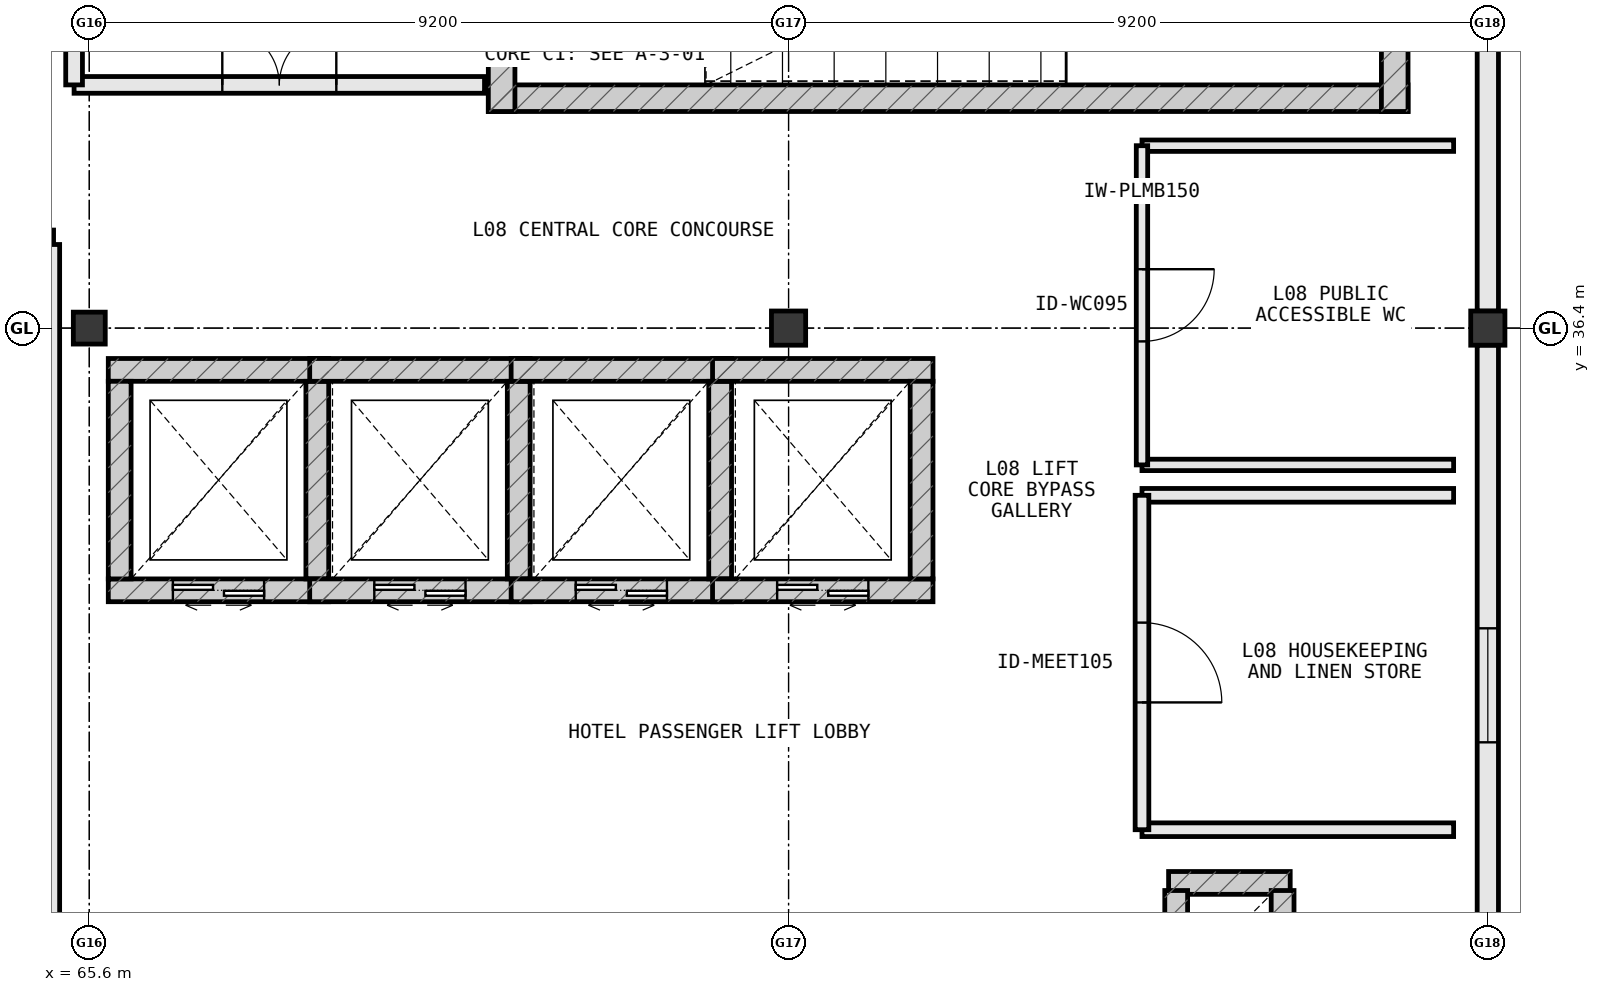
"""IFC4 building model, lengths in metres.
Left out: names, types, materials, properties, quantities, classifications, styles, units other than length and angle.
Written with IfcOpenShell. Run it as: python <this file> out.ifc"""

import sys

from ifc_helpers import new_model, si_unit, direction, frame, frame_2d, origin, origin_2d, place, context, subcontext, project, spatial, rectangle, extrude, element, fill, save


model = new_model("IFC4")
c1 = context("Model", 3, precision=1e-05, world=origin(), true_north=direction((0.0, 1.0)))
c2 = subcontext(c1, "Body", "Model", "MODEL_VIEW")
j1 = project(units=[si_unit("LENGTHUNIT", "METRE"), si_unit("PLANEANGLEUNIT", "RADIAN")], contexts=[c1])
p1 = place(None, origin())
s1 = spatial("IfcSite", under=j1, at=p1, CompositionType="ELEMENT")
p2 = place(p1, origin())
s2 = spatial("IfcBuilding", under=s1, at=p2, CompositionType="ELEMENT")
p3 = place(p2, frame((0.0, 0.0, 35.2)))
s3 = spatial("IfcBuildingStorey", under=s2, at=p3, CompositionType="ELEMENT", Elevation=35.2)
for number, where, z_axis, x_axis in (
    (1, (74.8, 36.4, 0.0), (0.0, 0.0, 1.0), (1.0, 0.0, 0.0)),
    (2, (84.0, 36.4, 0.0), (0.0, 0.0, 1.0), (1.0, 0.0, 0.0)),
):
    element("IfcColumn", number, at=place(p3, frame(where, z_axis=z_axis, x_axis=x_axis)), inside=s3, PredefinedType="COLUMN", context=c2, shape_type="SweptSolid", body=[
        extrude(rectangle(XDim=0.45, YDim=0.45, at=origin_2d()), origin(), (0.0, 0.0, 1.0), 3.8),
    ])
p4 = place(p3, frame((65.6, 36.4, 0.0), z_axis=(0.0, 0.0, 1.0), x_axis=(1.0, 0.0, 0.0)))
e3 = element("IfcColumn", 3, at=p4, inside=s3, PredefinedType="COLUMN", context=c2, shape_type="SweptSolid", body=[
    extrude(rectangle(XDim=0.42, YDim=0.42, at=origin_2d()), origin(), (0.0, 0.0, 1.0), 3.8),
])
p5 = place(p3, frame((81.4, 29.1, 0.0), z_axis=(0.0, 0.0, 1.0), x_axis=(-1.0, 0.0, 0.0)))
e4 = element("IfcWall", 4, at=p5, inside=s3, PredefinedType="SHEAR", context=c2, shape_type="SweptSolid", body=[
    extrude(rectangle(XDim=1.6, YDim=0.3, at=frame_2d((0.8, 0.0))), origin(), (0.0, 0.0, 1.0), 3.565),
])
for number, where, z_axis, x_axis in (
    (5, (79.9, 29.0, 0.0), (0.0, 0.0, 1.0), (0.0, -1.0, 0.0)),
    (6, (81.3, 27.8, 0.0), (0.0, 0.0, 1.0), (0.0, 1.0, 0.0)),
):
    element("IfcWall", number, at=place(p3, frame(where, z_axis=z_axis, x_axis=x_axis)), inside=s3, PredefinedType="SHEAR", context=c2, shape_type="SweptSolid", body=[
        extrude(rectangle(XDim=1.2, YDim=0.3, at=frame_2d((0.6, 0.0))), origin(), (0.0, 0.0, 1.0), 3.565),
    ])
p6 = place(p3, frame((84.0, 27.223, 0.0), z_axis=(0.0, 0.0, 1.0), x_axis=(0.0, 1.0, 0.0)))
e7 = element("IfcWall", 7, at=p6, inside=s3, PredefinedType="STANDARD", context=c2, shape_type="SweptSolid", body=[
    extrude(rectangle(XDim=8.954, YDim=0.28, at=frame_2d((4.477, 0.0))), origin(), (0.0, 0.0, 1.0), 2.98),
])
p7 = place(p6, frame((3.727, 0.0, 0.85)))
e8 = element("IfcOpeningElement", 8, at=p7, cuts=e7, PredefinedType="OPENING", context=c2, shape_type="SweptSolid", body=[
    extrude(rectangle(XDim=1.5, YDim=1.75, at=frame_2d((0.75, 0.875))), frame((0.0, 0.152, 0.0), z_axis=(0.0, -1.0, 0.0), x_axis=(1.0, 0.0, 0.0)), (0.0, 0.0, 1.0), 0.304),
])
p8 = place(p3, frame((84.0, 36.623, 0.0), z_axis=(0.0, 0.0, 1.0), x_axis=(0.0, 1.0, 0.0)))
e9 = element("IfcWall", 9, at=p8, inside=s3, PredefinedType="STANDARD", context=c2, shape_type="SweptSolid", body=[
    extrude(rectangle(XDim=10.354, YDim=0.28, at=frame_2d((5.177, 0.0))), origin(), (0.0, 0.0, 1.0), 2.98),
])
p9 = place(p8, frame((7.015, 0.0, 0.85)))
e10 = element("IfcOpeningElement", 10, at=p9, cuts=e9, PredefinedType="OPENING", context=c2, shape_type="SweptSolid", body=[
    extrude(rectangle(XDim=1.5, YDim=1.75, at=frame_2d((0.75, 0.875))), frame((0.0, 0.152, 0.0), z_axis=(0.0, -1.0, 0.0), x_axis=(1.0, 0.0, 0.0)), (0.0, 0.0, 1.0), 0.304),
])
p10 = place(p3, frame((70.85, 39.425, 0.0), z_axis=(0.0, 0.0, 1.0), x_axis=(1.0, 0.0, 0.0)))
e11 = element("IfcWall", 11, at=p10, inside=s3, PredefinedType="SHEAR", context=c2, shape_type="SweptSolid", body=[
    extrude(rectangle(XDim=12.1, YDim=0.35, at=frame_2d((6.05, 0.0))), origin(), (0.0, 0.0, 1.0), 3.8),
])
p11 = place(p3, frame((82.775, 39.25, 0.0), z_axis=(0.0, 0.0, 1.0), x_axis=(0.0, 1.0, 0.0)))
e12 = element("IfcWall", 12, at=p11, inside=s3, PredefinedType="SHEAR", context=c2, shape_type="SweptSolid", body=[
    extrude(rectangle(XDim=5.1, YDim=0.35, at=frame_2d((2.55, 0.0))), origin(), (0.0, 0.0, 1.0), 3.8),
])
p12 = place(p3, frame((71.025, 44.35, 0.0), z_axis=(0.0, 0.0, 1.0), x_axis=(0.0, -1.0, 0.0)))
e13 = element("IfcWall", 13, at=p12, inside=s3, PredefinedType="SHEAR", context=c2, shape_type="SweptSolid", body=[
    extrude(rectangle(XDim=5.1, YDim=0.35, at=frame_2d((2.55, 0.0))), origin(), (0.0, 0.0, 1.0), 3.8),
])
p13 = place(p12, frame((2.0, 0.0, 0.0)))
e14 = element("IfcOpeningElement", 14, at=p13, cuts=e13, PredefinedType="OPENING", context=c2, shape_type="SweptSolid", body=[
    extrude(rectangle(XDim=1.1, YDim=2.2, at=frame_2d((0.55, 1.1))), frame((0.0, 0.187, 0.0), z_axis=(0.0, -1.0, 0.0), x_axis=(1.0, 0.0, 0.0)), (0.0, 0.0, 1.0), 0.374),
])
p14 = place(p3, frame((65.85, 32.95, 0.0), z_axis=(0.0, 0.0, 1.0), x_axis=(1.0, 0.0, 0.0)))
e15 = element("IfcWall", 15, at=p14, inside=s3, PredefinedType="SHEAR", context=c2, shape_type="SweptSolid", body=[
    extrude(rectangle(XDim=2.9, YDim=0.3, at=frame_2d((1.45, 0.0))), origin(), (0.0, 0.0, 1.0), 3.8),
])
p15 = place(p14, frame((0.85, 0.0, 0.0)))
e16 = element("IfcOpeningElement", 16, at=p15, cuts=e15, PredefinedType="OPENING", context=c2, shape_type="SweptSolid", body=[
    extrude(rectangle(XDim=1.2, YDim=2.2, at=frame_2d((0.6, 1.1))), frame((0.0, 0.162, 0.0), z_axis=(0.0, -1.0, 0.0), x_axis=(1.0, 0.0, 0.0)), (0.0, 0.0, 1.0), 0.324),
])
p16 = place(p3, frame((68.75, 35.85, 0.0), z_axis=(0.0, 0.0, 1.0), x_axis=(-1.0, 0.0, 0.0)))
e17 = element("IfcWall", 17, at=p16, inside=s3, PredefinedType="SHEAR", context=c2, shape_type="SweptSolid", body=[
    extrude(rectangle(XDim=2.9, YDim=0.3, at=frame_2d((1.45, 0.0))), origin(), (0.0, 0.0, 1.0), 3.8),
])
for number, where, z_axis, x_axis in (
    (18, (68.6, 33.1, 0.0), (0.0, 0.0, 1.0), (0.0, 1.0, 0.0)),
    (19, (66.0, 35.7, 0.0), (0.0, 0.0, 1.0), (0.0, -1.0, 0.0)),
):
    element("IfcWall", number, at=place(p3, frame(where, z_axis=z_axis, x_axis=x_axis)), inside=s3, PredefinedType="SHEAR", context=c2, shape_type="SweptSolid", body=[
        extrude(rectangle(XDim=2.6, YDim=0.3, at=frame_2d((1.3, 0.0))), origin(), (0.0, 0.0, 1.0), 3.8),
    ])
p17 = place(p3, frame((68.5, 32.95, 0.0), z_axis=(0.0, 0.0, 1.0), x_axis=(1.0, 0.0, 0.0)))
e20 = element("IfcWall", 20, at=p17, inside=s3, PredefinedType="SHEAR", context=c2, shape_type="SweptSolid", body=[
    extrude(rectangle(XDim=2.9, YDim=0.3, at=frame_2d((1.45, 0.0))), origin(), (0.0, 0.0, 1.0), 3.8),
])
p18 = place(p17, frame((0.85, 0.0, 0.0)))
e21 = element("IfcOpeningElement", 21, at=p18, cuts=e20, PredefinedType="OPENING", context=c2, shape_type="SweptSolid", body=[
    extrude(rectangle(XDim=1.2, YDim=2.2, at=frame_2d((0.6, 1.1))), frame((0.0, 0.162, 0.0), z_axis=(0.0, -1.0, 0.0), x_axis=(1.0, 0.0, 0.0)), (0.0, 0.0, 1.0), 0.324),
])
p19 = place(p3, frame((71.4, 35.85, 0.0), z_axis=(0.0, 0.0, 1.0), x_axis=(-1.0, 0.0, 0.0)))
e22 = element("IfcWall", 22, at=p19, inside=s3, PredefinedType="SHEAR", context=c2, shape_type="SweptSolid", body=[
    extrude(rectangle(XDim=2.9, YDim=0.3, at=frame_2d((1.45, 0.0))), origin(), (0.0, 0.0, 1.0), 3.8),
])
p20 = place(p3, frame((71.25, 33.1, 0.0), z_axis=(0.0, 0.0, 1.0), x_axis=(0.0, 1.0, 0.0)))
e23 = element("IfcWall", 23, at=p20, inside=s3, PredefinedType="SHEAR", context=c2, shape_type="SweptSolid", body=[
    extrude(rectangle(XDim=2.6, YDim=0.3, at=frame_2d((1.3, 0.0))), origin(), (0.0, 0.0, 1.0), 3.8),
])
p21 = place(p3, frame((71.15, 32.95, 0.0), z_axis=(0.0, 0.0, 1.0), x_axis=(1.0, 0.0, 0.0)))
e24 = element("IfcWall", 24, at=p21, inside=s3, PredefinedType="SHEAR", context=c2, shape_type="SweptSolid", body=[
    extrude(rectangle(XDim=2.9, YDim=0.3, at=frame_2d((1.45, 0.0))), origin(), (0.0, 0.0, 1.0), 3.8),
])
p22 = place(p21, frame((0.85, 0.0, 0.0)))
e25 = element("IfcOpeningElement", 25, at=p22, cuts=e24, PredefinedType="OPENING", context=c2, shape_type="SweptSolid", body=[
    extrude(rectangle(XDim=1.2, YDim=2.2, at=frame_2d((0.6, 1.1))), frame((0.0, 0.162, 0.0), z_axis=(0.0, -1.0, 0.0), x_axis=(1.0, 0.0, 0.0)), (0.0, 0.0, 1.0), 0.324),
])
p23 = place(p3, frame((74.05, 35.85, 0.0), z_axis=(0.0, 0.0, 1.0), x_axis=(-1.0, 0.0, 0.0)))
e26 = element("IfcWall", 26, at=p23, inside=s3, PredefinedType="SHEAR", context=c2, shape_type="SweptSolid", body=[
    extrude(rectangle(XDim=2.9, YDim=0.3, at=frame_2d((1.45, 0.0))), origin(), (0.0, 0.0, 1.0), 3.8),
])
p24 = place(p3, frame((73.9, 33.1, 0.0), z_axis=(0.0, 0.0, 1.0), x_axis=(0.0, 1.0, 0.0)))
e27 = element("IfcWall", 27, at=p24, inside=s3, PredefinedType="SHEAR", context=c2, shape_type="SweptSolid", body=[
    extrude(rectangle(XDim=2.6, YDim=0.3, at=frame_2d((1.3, 0.0))), origin(), (0.0, 0.0, 1.0), 3.8),
])
p25 = place(p3, frame((73.8, 32.95, 0.0), z_axis=(0.0, 0.0, 1.0), x_axis=(1.0, 0.0, 0.0)))
e28 = element("IfcWall", 28, at=p25, inside=s3, PredefinedType="SHEAR", context=c2, shape_type="SweptSolid", body=[
    extrude(rectangle(XDim=2.9, YDim=0.3, at=frame_2d((1.45, 0.0))), origin(), (0.0, 0.0, 1.0), 3.8),
])
p26 = place(p25, frame((0.85, 0.0, 0.0)))
e29 = element("IfcOpeningElement", 29, at=p26, cuts=e28, PredefinedType="OPENING", context=c2, shape_type="SweptSolid", body=[
    extrude(rectangle(XDim=1.2, YDim=2.2, at=frame_2d((0.6, 1.1))), frame((0.0, 0.162, 0.0), z_axis=(0.0, -1.0, 0.0), x_axis=(1.0, 0.0, 0.0)), (0.0, 0.0, 1.0), 0.324),
])
p27 = place(p3, frame((76.7, 35.85, 0.0), z_axis=(0.0, 0.0, 1.0), x_axis=(-1.0, 0.0, 0.0)))
e30 = element("IfcWall", 30, at=p27, inside=s3, PredefinedType="SHEAR", context=c2, shape_type="SweptSolid", body=[
    extrude(rectangle(XDim=2.9, YDim=0.3, at=frame_2d((1.45, 0.0))), origin(), (0.0, 0.0, 1.0), 3.8),
])
p28 = place(p3, frame((76.55, 33.1, 0.0), z_axis=(0.0, 0.0, 1.0), x_axis=(0.0, 1.0, 0.0)))
e31 = element("IfcWall", 31, at=p28, inside=s3, PredefinedType="SHEAR", context=c2, shape_type="SweptSolid", body=[
    extrude(rectangle(XDim=2.6, YDim=0.3, at=frame_2d((1.3, 0.0))), origin(), (0.0, 0.0, 1.0), 3.8),
])
p29 = place(p3, frame((65.4, 39.6, 0.0), z_axis=(0.0, 0.0, 1.0), x_axis=(1.0, 0.0, 0.0)))
e32 = element("IfcWall", 32, at=p29, inside=s3, PredefinedType="STANDARD", context=c2, shape_type="SweptSolid", body=[
    extrude(rectangle(XDim=5.4, YDim=0.22, at=frame_2d((2.7, 0.0))), origin(), (0.0, 0.0, 1.0), 3.565),
])
p30 = place(p29, frame((1.95, 0.0, 0.0)))
e33 = element("IfcOpeningElement", 33, at=p30, cuts=e32, PredefinedType="OPENING", context=c2, shape_type="SweptSolid", body=[
    extrude(rectangle(XDim=1.5, YDim=2.2, at=frame_2d((0.75, 1.1))), frame((0.0, 0.122, 0.0), z_axis=(0.0, -1.0, 0.0), x_axis=(1.0, 0.0, 0.0)), (0.0, 0.0, 1.0), 0.244),
])
p31 = place(p3, frame((65.4, 43.85, 0.0), z_axis=(0.0, 0.0, 1.0), x_axis=(0.0, -1.0, 0.0)))
e34 = element("IfcWall", 34, at=p31, inside=s3, PredefinedType="STANDARD", context=c2, shape_type="SweptSolid", body=[
    extrude(rectangle(XDim=4.25, YDim=0.22, at=frame_2d((2.125, 0.0))), origin(), (0.0, 0.0, 1.0), 3.565),
])
p32 = place(p31, frame((1.375, 0.0, 0.0)))
e35 = element("IfcOpeningElement", 35, at=p32, cuts=e34, PredefinedType="OPENING", context=c2, shape_type="SweptSolid", body=[
    extrude(rectangle(XDim=1.5, YDim=2.2, at=frame_2d((0.75, 1.1))), frame((0.0, 0.122, 0.0), z_axis=(0.0, -1.0, 0.0), x_axis=(1.0, 0.0, 0.0)), (0.0, 0.0, 1.0), 0.244),
])
for number, where, z_axis, x_axis in (
    (36, (79.45, 29.8, 0.0), (0.0, 0.0, 1.0), (1.0, 0.0, 0.0)),
    (37, (83.55, 34.2, 0.0), (0.0, 0.0, 1.0), (-1.0, 0.0, 0.0)),
):
    element("IfcWall", number, at=place(p3, frame(where, z_axis=z_axis, x_axis=x_axis)), inside=s3, PredefinedType="PARTITIONING", context=c2, shape_type="SweptSolid", body=[
        extrude(rectangle(XDim=4.1, YDim=0.18, at=frame_2d((2.05, 0.0))), origin(), (0.0, 0.0, 1.0), 3.565),
    ])
p33 = place(p3, frame((79.45, 34.2, 0.0), z_axis=(0.0, 0.0, 1.0), x_axis=(0.0, -1.0, 0.0)))
e38 = element("IfcWall", 38, at=p33, inside=s3, PredefinedType="PARTITIONING", context=c2, shape_type="SweptSolid", body=[
    extrude(rectangle(XDim=4.4, YDim=0.18, at=frame_2d((2.2, 0.0))), origin(), (0.0, 0.0, 1.0), 3.565),
])
p34 = place(p33, frame((1.675, 0.0, 0.0)))
e39 = element("IfcOpeningElement", 39, at=p34, cuts=e38, PredefinedType="OPENING", context=c2, shape_type="SweptSolid", body=[
    extrude(rectangle(XDim=1.05, YDim=2.2, at=frame_2d((0.525, 1.1))), frame((0.0, 0.102, 0.0), z_axis=(0.0, -1.0, 0.0), x_axis=(1.0, 0.0, 0.0)), (0.0, 0.0, 1.0), 0.204),
])
for number, where, z_axis, x_axis in (
    (40, (79.45, 34.6, 0.0), (0.0, 0.0, 1.0), (1.0, 0.0, 0.0)),
    (41, (83.55, 38.8, 0.0), (0.0, 0.0, 1.0), (-1.0, 0.0, 0.0)),
):
    element("IfcWall", number, at=place(p3, frame(where, z_axis=z_axis, x_axis=x_axis)), inside=s3, PredefinedType="PLUMBINGWALL", context=c2, shape_type="SweptSolid", body=[
        extrude(rectangle(XDim=4.1, YDim=0.15, at=frame_2d((2.05, 0.0))), origin(), (0.0, 0.0, 1.0), 3.565),
    ])
p35 = place(p3, frame((79.45, 38.8, 0.0), z_axis=(0.0, 0.0, 1.0), x_axis=(0.0, -1.0, 0.0)))
e42 = element("IfcWall", 42, at=p35, inside=s3, PredefinedType="PLUMBINGWALL", context=c2, shape_type="SweptSolid", body=[
    extrude(rectangle(XDim=4.2, YDim=0.15, at=frame_2d((2.1, 0.0))), origin(), (0.0, 0.0, 1.0), 3.565),
])
p36 = place(p35, frame((1.625, 0.0, 0.0)))
e43 = element("IfcOpeningElement", 43, at=p36, cuts=e42, PredefinedType="OPENING", context=c2, shape_type="SweptSolid", body=[
    extrude(rectangle(XDim=0.95, YDim=2.15, at=frame_2d((0.475, 1.075))), frame((0.0, 0.087, 0.0), z_axis=(0.0, -1.0, 0.0), x_axis=(1.0, 0.0, 0.0)), (0.0, 0.0, 1.0), 0.174),
])
p37 = place(p3, frame((65.13, 37.6, 0.0), z_axis=(0.0, 0.0, 1.0), x_axis=(-1.0, 0.0, 0.0)))
e44 = element("IfcWall", 44, at=p37, inside=s3, PredefinedType="PARTITIONING", context=c2, shape_type="SweptSolid", body=[
    extrude(rectangle(XDim=5.68, YDim=0.18, at=frame_2d((2.84, 0.0))), origin(), (0.0, 0.0, 1.0), 3.565),
])
p38 = place(p37, frame((1.37, 0.0, 0.0)))
e45 = element("IfcOpeningElement", 45, at=p38, cuts=e44, PredefinedType="OPENING", context=c2, shape_type="SweptSolid", body=[
    extrude(rectangle(XDim=0.98, YDim=2.18, at=frame_2d((0.49, 1.09))), frame((0.0, 0.102, 0.0), z_axis=(0.0, -1.0, 0.0), x_axis=(1.0, 0.0, 0.0)), (0.0, 0.0, 1.0), 0.204),
])
p39 = place(p3, frame((65.13, 27.16, 0.0), z_axis=(0.0, 0.0, 1.0), x_axis=(0.0, 1.0, 0.0)))
e46 = element("IfcWall", 46, at=p39, inside=s3, PredefinedType="PARTITIONING", context=c2, shape_type="SweptSolid", body=[
    extrude(rectangle(XDim=10.34, YDim=0.16, at=frame_2d((5.17, 0.0))), origin(), (0.0, 0.0, 1.0), 3.565),
])
p40 = place(p7, origin())
e47 = element("IfcWindow", 47, at=p40, inside=s3, PartitioningType="SINGLE_PANEL", PredefinedType="WINDOW", context=c2, shape_type="SweptSolid", body=[
    extrude(rectangle(XDim=1.5, YDim=1.75, at=frame_2d((0.75, 0.875))), frame((0.0, 0.03, 0.0), z_axis=(0.0, -1.0, 0.0), x_axis=(1.0, 0.0, 0.0)), (0.0, 0.0, 1.0), 0.06),
])
fill(e8, e47)
p41 = place(p15, origin())
e48 = element("IfcDoor", 48, at=p41, inside=s3, OperationType="DOUBLE_DOOR_SLIDING", PredefinedType="DOOR", context=c2, shape_type="SweptSolid", body=[
    extrude(rectangle(XDim=1.2, YDim=2.2, at=frame_2d((0.6, 1.1))), frame((0.0, 0.025, 0.0), z_axis=(0.0, -1.0, 0.0), x_axis=(1.0, 0.0, 0.0)), (0.0, 0.0, 1.0), 0.05),
])
fill(e16, e48)
p42 = place(p18, origin())
e49 = element("IfcDoor", 49, at=p42, inside=s3, OperationType="DOUBLE_DOOR_SLIDING", PredefinedType="DOOR", context=c2, shape_type="SweptSolid", body=[
    extrude(rectangle(XDim=1.2, YDim=2.2, at=frame_2d((0.6, 1.1))), frame((0.0, 0.025, 0.0), z_axis=(0.0, -1.0, 0.0), x_axis=(1.0, 0.0, 0.0)), (0.0, 0.0, 1.0), 0.05),
])
fill(e21, e49)
p43 = place(p22, origin())
e50 = element("IfcDoor", 50, at=p43, inside=s3, OperationType="DOUBLE_DOOR_SLIDING", PredefinedType="DOOR", context=c2, shape_type="SweptSolid", body=[
    extrude(rectangle(XDim=1.2, YDim=2.2, at=frame_2d((0.6, 1.1))), frame((0.0, 0.025, 0.0), z_axis=(0.0, -1.0, 0.0), x_axis=(1.0, 0.0, 0.0)), (0.0, 0.0, 1.0), 0.05),
])
fill(e25, e50)
p44 = place(p26, origin())
e51 = element("IfcDoor", 51, at=p44, inside=s3, OperationType="DOUBLE_DOOR_SLIDING", PredefinedType="DOOR", context=c2, shape_type="SweptSolid", body=[
    extrude(rectangle(XDim=1.2, YDim=2.2, at=frame_2d((0.6, 1.1))), frame((0.0, 0.025, 0.0), z_axis=(0.0, -1.0, 0.0), x_axis=(1.0, 0.0, 0.0)), (0.0, 0.0, 1.0), 0.05),
])
fill(e29, e51)
p45 = place(p30, origin())
e52 = element("IfcDoor", 52, at=p45, inside=s3, OperationType="DOUBLE_DOOR_SINGLE_SWING", PredefinedType="DOOR", context=c2, shape_type="SweptSolid", body=[
    extrude(rectangle(XDim=1.5, YDim=2.2, at=frame_2d((0.75, 1.1))), frame((0.0, 0.025, 0.0), z_axis=(0.0, -1.0, 0.0), x_axis=(1.0, 0.0, 0.0)), (0.0, 0.0, 1.0), 0.05),
])
fill(e33, e52)
p46 = place(p34, origin())
e53 = element("IfcDoor", 53, at=p46, inside=s3, OperationType="SINGLE_SWING_RIGHT", PredefinedType="DOOR", context=c2, shape_type="SweptSolid", body=[
    extrude(rectangle(XDim=1.05, YDim=2.2, at=frame_2d((0.525, 1.1))), frame((0.0, 0.025, 0.0), z_axis=(0.0, -1.0, 0.0), x_axis=(1.0, 0.0, 0.0)), (0.0, 0.0, 1.0), 0.05),
])
fill(e39, e53)
p47 = place(p36, origin())
e54 = element("IfcDoor", 54, at=p47, inside=s3, OperationType="SINGLE_SWING_LEFT", PredefinedType="DOOR", context=c2, shape_type="SweptSolid", body=[
    extrude(rectangle(XDim=0.95, YDim=2.15, at=frame_2d((0.475, 1.075))), frame((0.0, 0.025, 0.0), z_axis=(0.0, -1.0, 0.0), x_axis=(1.0, 0.0, 0.0)), (0.0, 0.0, 1.0), 0.05),
])
fill(e43, e54)
save(model, sys.argv[1])
